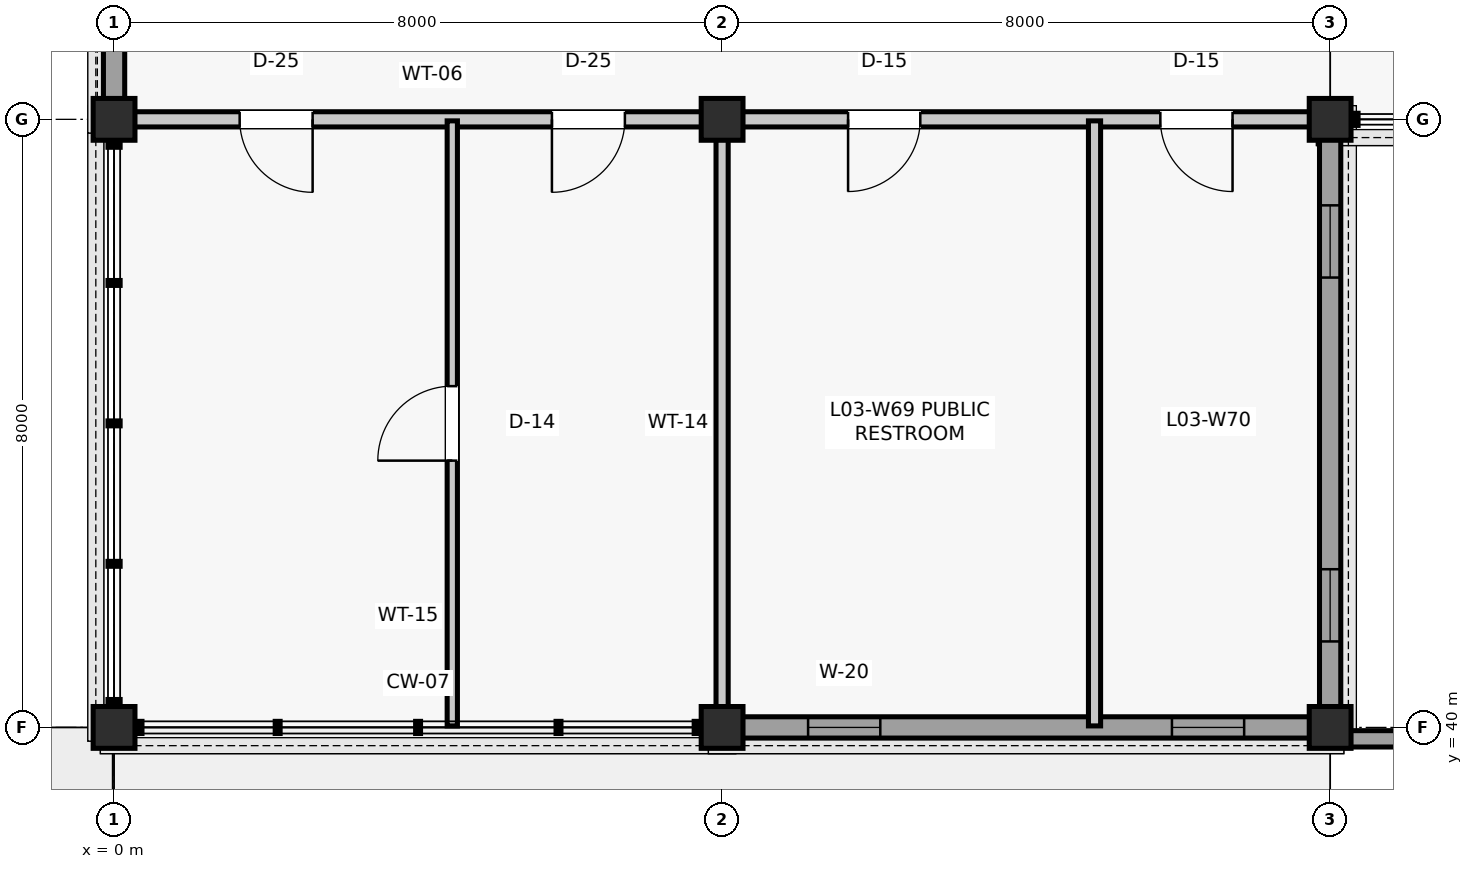
"""IFC4 building model, lengths in metres.
Left out: names, types, materials, properties, quantities, classifications, styles, units other than length and angle.
Written with IfcOpenShell. Run it as: python <this file> out.ifc"""

import sys

from ifc_helpers import new_model, si_unit, direction, frame, frame_2d, origin, origin_2d, place, context, subcontext, project, spatial, rectangle, extrude, element, fill, save


model = new_model("IFC4")
c1 = context("Model", 3, precision=1e-05, world=origin(), true_north=direction((0.0, 1.0)))
c2 = subcontext(c1, "Body", "Model", "MODEL_VIEW")
j1 = project(units=[si_unit("LENGTHUNIT", "METRE"), si_unit("PLANEANGLEUNIT", "RADIAN")], contexts=[c1])
p1 = place(None, origin())
s1 = spatial("IfcSite", under=j1, at=p1, CompositionType="ELEMENT")
p2 = place(p1, origin())
s2 = spatial("IfcBuilding", under=s1, at=p2, CompositionType="ELEMENT")
p3 = place(p2, frame((0.0, 0.0, 13.86)))
s3 = spatial("IfcBuildingStorey", under=s2, at=p3, CompositionType="ELEMENT", Elevation=13.86)
for number, where, z_axis, x_axis in (
    (1, (0.0, 40.0, 0.0), (0.0, 0.0, 1.0), (1.0, 0.0, 0.0)),
    (2, (0.0, 48.0, 0.0), (0.0, 0.0, 1.0), (1.0, 0.0, 0.0)),
    (3, (8.0, 40.0, 0.0), (0.0, 0.0, 1.0), (1.0, 0.0, 0.0)),
    (4, (8.0, 48.0, 0.0), (0.0, 0.0, 1.0), (1.0, 0.0, 0.0)),
    (5, (16.0, 40.0, 0.0), (0.0, 0.0, 1.0), (1.0, 0.0, 0.0)),
    (6, (16.0, 48.0, 0.0), (0.0, 0.0, 1.0), (1.0, 0.0, 0.0)),
):
    element("IfcColumn", number, at=place(p3, frame(where, z_axis=z_axis, x_axis=x_axis)), inside=s3, PredefinedType="COLUMN", context=c2, shape_type="SweptSolid", body=[
        extrude(rectangle(XDim=0.55, YDim=0.55, at=origin_2d()), origin(), (0.0, 0.0, 1.0), 3.96),
    ])
p4 = place(p3, frame((0.0, 48.26, 0.0), z_axis=(0.0, 0.0, 1.0), x_axis=(0.0, 1.0, 0.0)))
e7 = element("IfcWall", 7, at=p4, inside=s3, PredefinedType="SOLIDWALL", context=c2, shape_type="SweptSolid", body=[
    extrude(rectangle(XDim=7.48, YDim=0.28, at=frame_2d((3.74, 0.0))), origin(), (0.0, 0.0, 1.0), 3.364),
])
p5 = place(p4, frame((0.706, 0.0, 0.95)))
e8 = element("IfcOpeningElement", 8, at=p5, cuts=e7, PredefinedType="OPENING", context=c2, shape_type="SweptSolid", body=[
    extrude(rectangle(XDim=1.28, YDim=1.72, at=frame_2d((0.64, 0.86))), frame((0.0, 0.15, 0.0), z_axis=(0.0, -1.0, 0.0), x_axis=(1.0, 0.0, 0.0)), (0.0, 0.0, 1.0), 0.3),
])
p6 = place(p4, frame((5.494, 0.0, 0.95)))
e9 = element("IfcOpeningElement", 9, at=p6, cuts=e7, PredefinedType="OPENING", context=c2, shape_type="SweptSolid", body=[
    extrude(rectangle(XDim=1.28, YDim=1.72, at=frame_2d((0.64, 0.86))), frame((0.0, 0.15, 0.0), z_axis=(0.0, -1.0, 0.0), x_axis=(1.0, 0.0, 0.0)), (0.0, 0.0, 1.0), 0.3),
])
p7 = place(p3, frame((8.26, 40.0, 0.0), z_axis=(0.0, 0.0, 1.0), x_axis=(1.0, 0.0, 0.0)))
e10 = element("IfcWall", 10, at=p7, inside=s3, PredefinedType="SOLIDWALL", context=c2, shape_type="SweptSolid", body=[
    extrude(rectangle(XDim=7.48, YDim=0.28, at=frame_2d((3.74, 0.0))), origin(), (0.0, 0.0, 1.0), 3.364),
])
p8 = place(p7, frame((0.871, 0.0, 1.2)))
e11 = element("IfcOpeningElement", 11, at=p8, cuts=e10, PredefinedType="OPENING", context=c2, shape_type="SweptSolid", body=[
    extrude(rectangle(XDim=0.95, YDim=1.4, at=frame_2d((0.475, 0.7))), frame((0.0, 0.15, 0.0), z_axis=(0.0, -1.0, 0.0), x_axis=(1.0, 0.0, 0.0)), (0.0, 0.0, 1.0), 0.3),
])
p9 = place(p7, frame((5.659, 0.0, 1.2)))
e12 = element("IfcOpeningElement", 12, at=p9, cuts=e10, PredefinedType="OPENING", context=c2, shape_type="SweptSolid", body=[
    extrude(rectangle(XDim=0.95, YDim=1.4, at=frame_2d((0.475, 0.7))), frame((0.0, 0.15, 0.0), z_axis=(0.0, -1.0, 0.0), x_axis=(1.0, 0.0, 0.0)), (0.0, 0.0, 1.0), 0.3),
])
p10 = place(p3, frame((16.0, 40.26, 0.0), z_axis=(0.0, 0.0, 1.0), x_axis=(0.0, 1.0, 0.0)))
e13 = element("IfcWall", 13, at=p10, inside=s3, PredefinedType="SOLIDWALL", context=c2, shape_type="SweptSolid", body=[
    extrude(rectangle(XDim=7.48, YDim=0.28, at=frame_2d((3.74, 0.0))), origin(), (0.0, 0.0, 1.0), 3.304),
])
p11 = place(p10, frame((0.871, 0.0, 1.2)))
e14 = element("IfcOpeningElement", 14, at=p11, cuts=e13, PredefinedType="OPENING", context=c2, shape_type="SweptSolid", body=[
    extrude(rectangle(XDim=0.95, YDim=1.4, at=frame_2d((0.475, 0.7))), frame((0.0, 0.15, 0.0), z_axis=(0.0, -1.0, 0.0), x_axis=(1.0, 0.0, 0.0)), (0.0, 0.0, 1.0), 0.3),
])
p12 = place(p10, frame((5.659, 0.0, 1.2)))
e15 = element("IfcOpeningElement", 15, at=p12, cuts=e13, PredefinedType="OPENING", context=c2, shape_type="SweptSolid", body=[
    extrude(rectangle(XDim=0.95, YDim=1.4, at=frame_2d((0.475, 0.7))), frame((0.0, 0.15, 0.0), z_axis=(0.0, -1.0, 0.0), x_axis=(1.0, 0.0, 0.0)), (0.0, 0.0, 1.0), 0.3),
])
p13 = place(p3, frame((16.12, 39.85, 0.0), z_axis=(0.0, 0.0, 1.0), x_axis=(1.0, 0.0, 0.0)))
e16 = element("IfcWall", 16, at=p13, inside=s3, PredefinedType="PARAPET", context=c2, shape_type="SweptSolid", body=[
    extrude(rectangle(XDim=23.76, YDim=0.215, at=frame_2d((11.88, 0.0))), origin(), (0.0, 0.0, 1.0), 0.95),
])
p14 = place(p3, frame((8.0, 40.265, 0.0), z_axis=(0.0, 0.0, 1.0), x_axis=(0.0, 1.0, 0.0)))
e17 = element("IfcWall", 17, at=p14, inside=s3, PredefinedType="PARTITIONING", context=c2, shape_type="SweptSolid", body=[
    extrude(rectangle(XDim=7.47, YDim=0.16, at=frame_2d((3.735, 0.0))), origin(), (0.0, 0.0, 1.0), 3.247),
])
p15 = place(p3, frame((0.265, 48.0, 0.0), z_axis=(0.0, 0.0, 1.0), x_axis=(1.0, 0.0, 0.0)))
e18 = element("IfcWall", 18, at=p15, inside=s3, PredefinedType="PARTITIONING", context=c2, shape_type="SweptSolid", body=[
    extrude(rectangle(XDim=7.47, YDim=0.2, at=frame_2d((3.735, 0.0))), origin(), (0.0, 0.0, 1.0), 3.241),
])
p16 = place(p15, frame((1.387, 0.0, 0.0)))
e19 = element("IfcOpeningElement", 19, at=p16, cuts=e18, PredefinedType="OPENING", context=c2, shape_type="SweptSolid", body=[
    extrude(rectangle(XDim=0.96, YDim=2.14, at=frame_2d((0.48, 1.07))), frame((0.0, 0.11, 0.0), z_axis=(0.0, -1.0, 0.0), x_axis=(1.0, 0.0, 0.0)), (0.0, 0.0, 1.0), 0.22),
])
p17 = place(p15, frame((5.496, 0.0, 0.0)))
e20 = element("IfcOpeningElement", 20, at=p17, cuts=e18, PredefinedType="OPENING", context=c2, shape_type="SweptSolid", body=[
    extrude(rectangle(XDim=0.96, YDim=2.14, at=frame_2d((0.48, 1.07))), frame((0.0, 0.11, 0.0), z_axis=(0.0, -1.0, 0.0), x_axis=(1.0, 0.0, 0.0)), (0.0, 0.0, 1.0), 0.22),
])
p18 = place(p3, frame((8.265, 48.0, 0.0), z_axis=(0.0, 0.0, 1.0), x_axis=(1.0, 0.0, 0.0)))
e21 = element("IfcWall", 21, at=p18, inside=s3, PredefinedType="PARTITIONING", context=c2, shape_type="SweptSolid", body=[
    extrude(rectangle(XDim=7.47, YDim=0.2, at=frame_2d((3.735, 0.0))), origin(), (0.0, 0.0, 1.0), 3.452),
])
p19 = place(p18, frame((1.393, 0.0, 0.0)))
e22 = element("IfcOpeningElement", 22, at=p19, cuts=e21, PredefinedType="OPENING", context=c2, shape_type="SweptSolid", body=[
    extrude(rectangle(XDim=0.95, YDim=2.1, at=frame_2d((0.475, 1.05))), frame((0.0, 0.11, 0.0), z_axis=(0.0, -1.0, 0.0), x_axis=(1.0, 0.0, 0.0)), (0.0, 0.0, 1.0), 0.22),
])
p20 = place(p18, frame((5.501, 0.0, 0.0)))
e23 = element("IfcOpeningElement", 23, at=p20, cuts=e21, PredefinedType="OPENING", context=c2, shape_type="SweptSolid", body=[
    extrude(rectangle(XDim=0.95, YDim=2.1, at=frame_2d((0.475, 1.05))), frame((0.0, 0.11, 0.0), z_axis=(0.0, -1.0, 0.0), x_axis=(1.0, 0.0, 0.0)), (0.0, 0.0, 1.0), 0.22),
])
p21 = place(p3, frame((4.45, 40.02, 0.0), z_axis=(0.0, 0.0, 1.0), x_axis=(0.0, 1.0, 0.0)))
e24 = element("IfcWall", 24, at=p21, inside=s3, PredefinedType="PARTITIONING", context=c2, shape_type="SweptSolid", body=[
    extrude(rectangle(XDim=7.96, YDim=0.135, at=frame_2d((3.98, 0.0))), origin(), (0.0, 0.0, 1.0), 3.241),
])
p22 = place(p21, frame((3.49, 0.0, 0.0)))
e25 = element("IfcOpeningElement", 25, at=p22, cuts=e24, PredefinedType="OPENING", context=c2, shape_type="SweptSolid", body=[
    extrude(rectangle(XDim=0.98, YDim=2.15, at=frame_2d((0.49, 1.075))), frame((0.0, 0.077, 0.0), z_axis=(0.0, -1.0, 0.0), x_axis=(1.0, 0.0, 0.0)), (0.0, 0.0, 1.0), 0.155),
])
p23 = place(p3, frame((12.9, 40.02, 0.0), z_axis=(0.0, 0.0, 1.0), x_axis=(0.0, 1.0, 0.0)))
e26 = element("IfcWall", 26, at=p23, inside=s3, PredefinedType="PARTITIONING", context=c2, shape_type="SweptSolid", body=[
    extrude(rectangle(XDim=7.96, YDim=0.16, at=frame_2d((3.98, 0.0))), origin(), (0.0, 0.0, 1.0), 3.357),
])
p24 = place(p8, origin())
e27 = element("IfcWindow", 27, at=p24, inside=s3, PartitioningType="SINGLE_PANEL", PredefinedType="WINDOW", context=c2, shape_type="SweptSolid", body=[
    extrude(rectangle(XDim=0.95, YDim=1.4, at=frame_2d((0.475, 0.7))), frame((0.0, 0.03, 0.0), z_axis=(0.0, -1.0, 0.0), x_axis=(1.0, 0.0, 0.0)), (0.0, 0.0, 1.0), 0.06),
])
fill(e11, e27)
p25 = place(p9, origin())
e28 = element("IfcWindow", 28, at=p25, inside=s3, PartitioningType="SINGLE_PANEL", PredefinedType="WINDOW", context=c2, shape_type="SweptSolid", body=[
    extrude(rectangle(XDim=0.95, YDim=1.4, at=frame_2d((0.475, 0.7))), frame((0.0, 0.03, 0.0), z_axis=(0.0, -1.0, 0.0), x_axis=(1.0, 0.0, 0.0)), (0.0, 0.0, 1.0), 0.06),
])
fill(e12, e28)
p26 = place(p11, origin())
e29 = element("IfcWindow", 29, at=p26, inside=s3, PartitioningType="SINGLE_PANEL", PredefinedType="WINDOW", context=c2, shape_type="SweptSolid", body=[
    extrude(rectangle(XDim=0.95, YDim=1.4, at=frame_2d((0.475, 0.7))), frame((0.0, 0.03, 0.0), z_axis=(0.0, -1.0, 0.0), x_axis=(1.0, 0.0, 0.0)), (0.0, 0.0, 1.0), 0.06),
])
fill(e14, e29)
p27 = place(p12, origin())
e30 = element("IfcWindow", 30, at=p27, inside=s3, PartitioningType="SINGLE_PANEL", PredefinedType="WINDOW", context=c2, shape_type="SweptSolid", body=[
    extrude(rectangle(XDim=0.95, YDim=1.4, at=frame_2d((0.475, 0.7))), frame((0.0, 0.03, 0.0), z_axis=(0.0, -1.0, 0.0), x_axis=(1.0, 0.0, 0.0)), (0.0, 0.0, 1.0), 0.06),
])
fill(e15, e30)
p28 = place(p16, frame((0.96, 0.0, 0.0), z_axis=(0.0, 0.0, 1.0), x_axis=(-1.0, 0.0, 0.0)))
e31 = element("IfcDoor", 31, at=p28, inside=s3, OperationType="SINGLE_SWING_RIGHT", PredefinedType="DOOR", context=c2, shape_type="SweptSolid", body=[
    extrude(rectangle(XDim=0.96, YDim=2.14, at=frame_2d((0.48, 1.07))), frame((0.0, 0.025, 0.0), z_axis=(0.0, -1.0, 0.0), x_axis=(1.0, 0.0, 0.0)), (0.0, 0.0, 1.0), 0.05),
])
fill(e19, e31)
p29 = place(p17, frame((0.96, 0.0, 0.0), z_axis=(0.0, 0.0, 1.0), x_axis=(-1.0, 0.0, 0.0)))
e32 = element("IfcDoor", 32, at=p29, inside=s3, OperationType="SINGLE_SWING_LEFT", PredefinedType="DOOR", context=c2, shape_type="SweptSolid", body=[
    extrude(rectangle(XDim=0.96, YDim=2.14, at=frame_2d((0.48, 1.07))), frame((0.0, 0.025, 0.0), z_axis=(0.0, -1.0, 0.0), x_axis=(1.0, 0.0, 0.0)), (0.0, 0.0, 1.0), 0.05),
])
fill(e20, e32)
p30 = place(p19, frame((0.95, 0.0, 0.0), z_axis=(0.0, 0.0, 1.0), x_axis=(-1.0, 0.0, 0.0)))
e33 = element("IfcDoor", 33, at=p30, inside=s3, OperationType="SINGLE_SWING_LEFT", PredefinedType="DOOR", context=c2, shape_type="SweptSolid", body=[
    extrude(rectangle(XDim=0.95, YDim=2.1, at=frame_2d((0.475, 1.05))), frame((0.0, 0.025, 0.0), z_axis=(0.0, -1.0, 0.0), x_axis=(1.0, 0.0, 0.0)), (0.0, 0.0, 1.0), 0.05),
])
fill(e22, e33)
p31 = place(p20, frame((0.95, 0.0, 0.0), z_axis=(0.0, 0.0, 1.0), x_axis=(-1.0, 0.0, 0.0)))
e34 = element("IfcDoor", 34, at=p31, inside=s3, OperationType="SINGLE_SWING_RIGHT", PredefinedType="DOOR", context=c2, shape_type="SweptSolid", body=[
    extrude(rectangle(XDim=0.95, YDim=2.1, at=frame_2d((0.475, 1.05))), frame((0.0, 0.025, 0.0), z_axis=(0.0, -1.0, 0.0), x_axis=(1.0, 0.0, 0.0)), (0.0, 0.0, 1.0), 0.05),
])
fill(e23, e34)
p32 = place(p22, origin())
e35 = element("IfcDoor", 35, at=p32, inside=s3, OperationType="SINGLE_SWING_LEFT", PredefinedType="DOOR", context=c2, shape_type="SweptSolid", body=[
    extrude(rectangle(XDim=0.98, YDim=2.15, at=frame_2d((0.49, 1.075))), frame((0.0, 0.025, 0.0), z_axis=(0.0, -1.0, 0.0), x_axis=(1.0, 0.0, 0.0)), (0.0, 0.0, 1.0), 0.05),
])
fill(e25, e35)
save(model, sys.argv[1])
